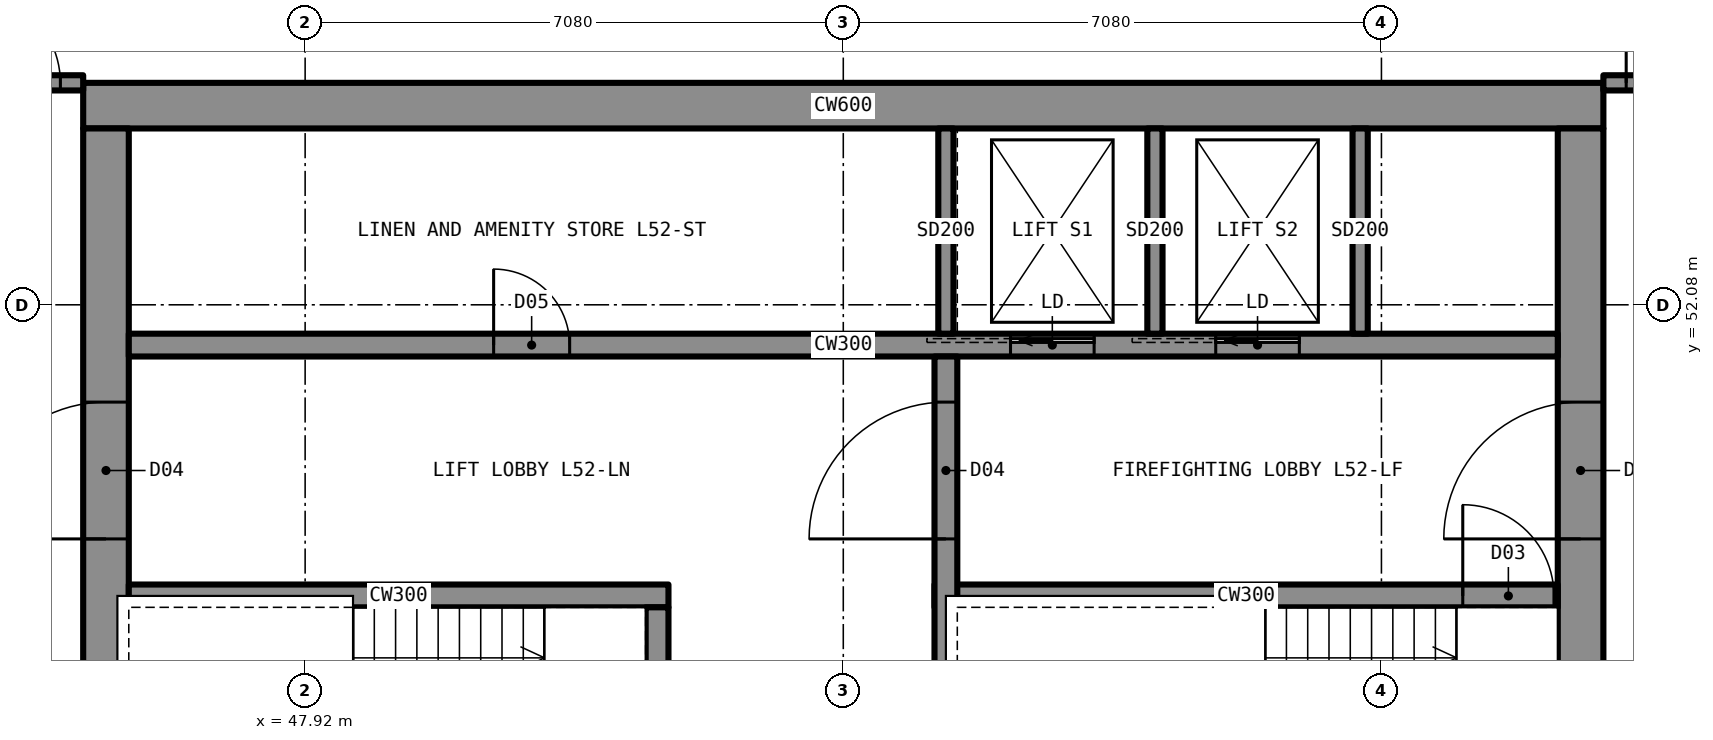
"""IFC4 building model, lengths in metres.
Left out: names, types, materials, properties, quantities, classifications, styles, units other than length and angle.
Written with IfcOpenShell. Run it as: python <this file> out.ifc"""

import sys

from ifc_helpers import new_model, si_unit, direction, frame, frame_2d, origin, place, context, subcontext, project, spatial, rectangle, extrude, element, fill, save


model = new_model("IFC4")
c1 = context("Model", 3, precision=1e-05, world=origin(), true_north=direction((0.0, 1.0)))
c2 = subcontext(c1, "Body", "Model", "MODEL_VIEW")
j1 = project(units=[si_unit("LENGTHUNIT", "METRE"), si_unit("PLANEANGLEUNIT", "RADIAN")], contexts=[c1])
p1 = place(None, origin())
s1 = spatial("IfcSite", under=j1, at=p1, CompositionType="ELEMENT")
p2 = place(p1, origin())
s2 = spatial("IfcBuilding", under=s1, at=p2, CompositionType="ELEMENT")
p3 = place(p2, frame((0.0, 0.0, 193.3)))
s3 = spatial("IfcBuildingStorey", under=s2, at=p3, CompositionType="ELEMENT", Elevation=193.3)
p4 = place(p3, frame((45.0, 54.7, 0.0), z_axis=(0.0, 0.0, 1.0), x_axis=(1.0, 0.0, 0.0)))
e1 = element("IfcWall", 1, at=p4, inside=s3, PredefinedType="SHEAR", context=c2, shape_type="SweptSolid", body=[
    extrude(rectangle(XDim=20.0, YDim=0.6, at=frame_2d((10.0, 0.0))), origin(), (0.0, 0.0, 1.0), 3.5),
])
p5 = place(p3, frame((64.7, 35.6, 0.0), z_axis=(0.0, 0.0, 1.0), x_axis=(0.0, 1.0, 0.0)))
e2 = element("IfcWall", 2, at=p5, inside=s3, PredefinedType="SHEAR", context=c2, shape_type="SweptSolid", body=[
    extrude(rectangle(XDim=18.8, YDim=0.6, at=frame_2d((9.4, 0.0))), origin(), (0.0, 0.0, 1.0), 3.5),
])
p6 = place(p5, frame((13.4, 0.0, 0.0)))
e3 = element("IfcOpeningElement", 3, at=p6, cuts=e2, PredefinedType="OPENING", context=c2, shape_type="SweptSolid", body=[
    extrude(rectangle(XDim=1.8, YDim=2.2, at=frame_2d((0.9, 1.1))), frame((0.0, 0.31, 0.0), z_axis=(0.0, -1.0, 0.0), x_axis=(1.0, 0.0, 0.0)), (0.0, 0.0, 1.0), 0.62),
])
p7 = place(p5, frame((3.6, 0.0, 0.0)))
e4 = element("IfcOpeningElement", 4, at=p7, cuts=e2, PredefinedType="OPENING", context=c2, shape_type="SweptSolid", body=[
    extrude(rectangle(XDim=1.8, YDim=2.2, at=frame_2d((0.9, 1.1))), frame((0.0, 0.31, 0.0), z_axis=(0.0, -1.0, 0.0), x_axis=(1.0, 0.0, 0.0)), (0.0, 0.0, 1.0), 0.62),
])
p8 = place(p3, frame((45.3, 35.6, 0.0), z_axis=(0.0, 0.0, 1.0), x_axis=(0.0, 1.0, 0.0)))
e5 = element("IfcWall", 5, at=p8, inside=s3, PredefinedType="SHEAR", context=c2, shape_type="SweptSolid", body=[
    extrude(rectangle(XDim=18.8, YDim=0.6, at=frame_2d((9.4, 0.0))), origin(), (0.0, 0.0, 1.0), 3.5),
])
p9 = place(p8, frame((13.4, 0.0, 0.0)))
e6 = element("IfcOpeningElement", 6, at=p9, cuts=e5, PredefinedType="OPENING", context=c2, shape_type="SweptSolid", body=[
    extrude(rectangle(XDim=1.8, YDim=2.2, at=frame_2d((0.9, 1.1))), frame((0.0, 0.31, 0.0), z_axis=(0.0, -1.0, 0.0), x_axis=(1.0, 0.0, 0.0)), (0.0, 0.0, 1.0), 0.62),
])
p10 = place(p8, frame((3.6, 0.0, 0.0)))
e7 = element("IfcOpeningElement", 7, at=p10, cuts=e5, PredefinedType="OPENING", context=c2, shape_type="SweptSolid", body=[
    extrude(rectangle(XDim=1.8, YDim=2.2, at=frame_2d((0.9, 1.1))), frame((0.0, 0.31, 0.0), z_axis=(0.0, -1.0, 0.0), x_axis=(1.0, 0.0, 0.0)), (0.0, 0.0, 1.0), 0.62),
])
p11 = place(p8, frame((6.4, 0.0, 0.0)))
e8 = element("IfcOpeningElement", 8, at=p11, cuts=e5, PredefinedType="OPENING", context=c2, shape_type="SweptSolid", body=[
    extrude(rectangle(XDim=1.2, YDim=2.2, at=frame_2d((0.6, 1.1))), frame((0.0, 0.31, 0.0), z_axis=(0.0, -1.0, 0.0), x_axis=(1.0, 0.0, 0.0)), (0.0, 0.0, 1.0), 0.62),
])
p12 = place(p3, frame((45.6, 51.55, 0.0), z_axis=(0.0, 0.0, 1.0), x_axis=(1.0, 0.0, 0.0)))
e9 = element("IfcWall", 9, at=p12, inside=s3, PredefinedType="SHEAR", context=c2, shape_type="SweptSolid", body=[
    extrude(rectangle(XDim=18.8, YDim=0.3, at=frame_2d((9.4, 0.0))), origin(), (0.0, 0.0, 1.0), 3.5),
])
p13 = place(p12, frame((4.8, 0.0, 0.0)))
e10 = element("IfcOpeningElement", 10, at=p13, cuts=e9, PredefinedType="OPENING", context=c2, shape_type="SweptSolid", body=[
    extrude(rectangle(XDim=1.0, YDim=2.1, at=frame_2d((0.5, 1.05))), frame((0.0, 0.16, 0.0), z_axis=(0.0, -1.0, 0.0), x_axis=(1.0, 0.0, 0.0)), (0.0, 0.0, 1.0), 0.32),
])
p14 = place(p12, frame((11.6, 0.0, 0.0)))
e11 = element("IfcOpeningElement", 11, at=p14, cuts=e9, PredefinedType="OPENING", context=c2, shape_type="SweptSolid", body=[
    extrude(rectangle(XDim=1.1, YDim=2.2, at=frame_2d((0.55, 1.1))), frame((0.0, 0.16, 0.0), z_axis=(0.0, -1.0, 0.0), x_axis=(1.0, 0.0, 0.0)), (0.0, 0.0, 1.0), 0.32),
])
p15 = place(p12, frame((14.3, 0.0, 0.0)))
e12 = element("IfcOpeningElement", 12, at=p15, cuts=e9, PredefinedType="OPENING", context=c2, shape_type="SweptSolid", body=[
    extrude(rectangle(XDim=1.1, YDim=2.2, at=frame_2d((0.55, 1.1))), frame((0.0, 0.16, 0.0), z_axis=(0.0, -1.0, 0.0), x_axis=(1.0, 0.0, 0.0)), (0.0, 0.0, 1.0), 0.32),
])
p16 = place(p3, frame((45.6, 48.25, 0.0), z_axis=(0.0, 0.0, 1.0), x_axis=(1.0, 0.0, 0.0)))
e13 = element("IfcWall", 13, at=p16, inside=s3, PredefinedType="SHEAR", context=c2, shape_type="SweptSolid", body=[
    extrude(rectangle(XDim=7.1, YDim=0.3, at=frame_2d((3.55, 0.0))), origin(), (0.0, 0.0, 1.0), 3.5),
])
p17 = place(p3, frame((56.2, 48.25, 0.0), z_axis=(0.0, 0.0, 1.0), x_axis=(1.0, 0.0, 0.0)))
e14 = element("IfcWall", 14, at=p17, inside=s3, PredefinedType="SHEAR", context=c2, shape_type="SweptSolid", body=[
    extrude(rectangle(XDim=8.2, YDim=0.3, at=frame_2d((4.1, 0.0))), origin(), (0.0, 0.0, 1.0), 3.5),
])
p18 = place(p17, frame((6.95, 0.0, 0.0)))
e15 = element("IfcOpeningElement", 15, at=p18, cuts=e14, PredefinedType="OPENING", context=c2, shape_type="SweptSolid", body=[
    extrude(rectangle(XDim=1.2, YDim=2.2, at=frame_2d((0.6, 1.1))), frame((0.0, 0.16, 0.0), z_axis=(0.0, -1.0, 0.0), x_axis=(1.0, 0.0, 0.0)), (0.0, 0.0, 1.0), 0.32),
])
p19 = place(p3, frame((52.55, 41.9, 0.0), z_axis=(0.0, 0.0, 1.0), x_axis=(0.0, 1.0, 0.0)))
e16 = element("IfcWall", 16, at=p19, inside=s3, PredefinedType="SHEAR", context=c2, shape_type="SweptSolid", body=[
    extrude(rectangle(XDim=6.2, YDim=0.3, at=frame_2d((3.1, 0.0))), origin(), (0.0, 0.0, 1.0), 3.5),
])
p20 = place(p19, frame((4.125, 0.0, 0.0)))
e17 = element("IfcOpeningElement", 17, at=p20, cuts=e16, PredefinedType="OPENING", context=c2, shape_type="SweptSolid", body=[
    extrude(rectangle(XDim=1.2, YDim=2.2, at=frame_2d((0.6, 1.1))), frame((0.0, 0.16, 0.0), z_axis=(0.0, -1.0, 0.0), x_axis=(1.0, 0.0, 0.0)), (0.0, 0.0, 1.0), 0.32),
])
p21 = place(p3, frame((56.35, 41.9, 0.0), z_axis=(0.0, 0.0, 1.0), x_axis=(0.0, 1.0, 0.0)))
e18 = element("IfcWall", 18, at=p21, inside=s3, PredefinedType="SHEAR", context=c2, shape_type="SweptSolid", body=[
    extrude(rectangle(XDim=9.5, YDim=0.3, at=frame_2d((4.75, 0.0))), origin(), (0.0, 0.0, 1.0), 3.5),
])
p22 = place(p21, frame((7.1, 0.0, 0.0)))
e19 = element("IfcOpeningElement", 19, at=p22, cuts=e18, PredefinedType="OPENING", context=c2, shape_type="SweptSolid", body=[
    extrude(rectangle(XDim=1.8, YDim=2.2, at=frame_2d((0.9, 1.1))), frame((0.0, 0.16, 0.0), z_axis=(0.0, -1.0, 0.0), x_axis=(1.0, 0.0, 0.0)), (0.0, 0.0, 1.0), 0.32),
])
p23 = place(p3, frame((43.2, 55.0, 0.0), z_axis=(0.0, 0.0, 1.0), x_axis=(1.0, 0.0, 0.0)))
e20 = element("IfcWall", 20, at=p23, inside=s3, PredefinedType="PARTITIONING", context=c2, shape_type="SweptSolid", body=[
    extrude(rectangle(XDim=1.8, YDim=0.2, at=frame_2d((0.9, 0.0))), origin(), (0.0, 0.0, 1.0), 3.33),
])
p24 = place(p23, frame((0.3, 0.0, 0.0)))
e21 = element("IfcOpeningElement", 21, at=p24, cuts=e20, PredefinedType="OPENING", context=c2, shape_type="SweptSolid", body=[
    extrude(rectangle(XDim=1.2, YDim=2.2, at=frame_2d((0.6, 1.1))), frame((0.0, 0.11, 0.0), z_axis=(0.0, -1.0, 0.0), x_axis=(1.0, 0.0, 0.0)), (0.0, 0.0, 1.0), 0.22),
])
p25 = place(p3, frame((65.0, 55.0, 0.0), z_axis=(0.0, 0.0, 1.0), x_axis=(1.0, 0.0, 0.0)))
e22 = element("IfcWall", 22, at=p25, inside=s3, PredefinedType="PARTITIONING", context=c2, shape_type="SweptSolid", body=[
    extrude(rectangle(XDim=1.8, YDim=0.2, at=frame_2d((0.9, 0.0))), origin(), (0.0, 0.0, 1.0), 3.33),
])
p26 = place(p25, frame((0.3, 0.0, 0.0)))
e23 = element("IfcOpeningElement", 23, at=p26, cuts=e22, PredefinedType="OPENING", context=c2, shape_type="SweptSolid", body=[
    extrude(rectangle(XDim=1.2, YDim=2.2, at=frame_2d((0.6, 1.1))), frame((0.0, 0.11, 0.0), z_axis=(0.0, -1.0, 0.0), x_axis=(1.0, 0.0, 0.0)), (0.0, 0.0, 1.0), 0.22),
])
for number, where, z_axis, x_axis in (
    (24, (59.1, 51.7, 0.0), (0.0, 0.0, 1.0), (0.0, 1.0, 0.0)),
    (25, (61.8, 51.7, 0.0), (0.0, 0.0, 1.0), (0.0, 1.0, 0.0)),
    (26, (56.35, 51.7, 0.0), (0.0, 0.0, 1.0), (0.0, 1.0, 0.0)),
):
    element("IfcWall", number, at=place(p3, frame(where, z_axis=z_axis, x_axis=x_axis)), inside=s3, PredefinedType="PARTITIONING", context=c2, shape_type="SweptSolid", body=[
        extrude(rectangle(XDim=2.7, YDim=0.2, at=frame_2d((1.35, 0.0))), origin(), (0.0, 0.0, 1.0), 3.33),
    ])
p27 = place(p24, origin())
e27 = element("IfcDoor", 27, at=p27, inside=s3, OperationType="SINGLE_SWING_LEFT", PredefinedType="DOOR", context=c2, shape_type="SweptSolid", body=[
    extrude(rectangle(XDim=1.2, YDim=2.2, at=frame_2d((0.6, 1.1))), frame((0.0, 0.025, 0.0), z_axis=(0.0, -1.0, 0.0), x_axis=(1.0, 0.0, 0.0)), (0.0, 0.0, 1.0), 0.05),
])
fill(e21, e27)
p28 = place(p26, origin())
e28 = element("IfcDoor", 28, at=p28, inside=s3, OperationType="SINGLE_SWING_LEFT", PredefinedType="DOOR", context=c2, shape_type="SweptSolid", body=[
    extrude(rectangle(XDim=1.2, YDim=2.2, at=frame_2d((0.6, 1.1))), frame((0.0, 0.025, 0.0), z_axis=(0.0, -1.0, 0.0), x_axis=(1.0, 0.0, 0.0)), (0.0, 0.0, 1.0), 0.05),
])
fill(e23, e28)
p29 = place(p9, origin())
e29 = element("IfcDoor", 29, at=p29, inside=s3, OperationType="DOUBLE_DOOR_SINGLE_SWING", PredefinedType="DOOR", context=c2, shape_type="SweptSolid", body=[
    extrude(rectangle(XDim=1.8, YDim=2.2, at=frame_2d((0.9, 1.1))), frame((0.0, 0.025, 0.0), z_axis=(0.0, -1.0, 0.0), x_axis=(1.0, 0.0, 0.0)), (0.0, 0.0, 1.0), 0.05),
])
fill(e6, e29)
p30 = place(p6, origin())
e30 = element("IfcDoor", 30, at=p30, inside=s3, OperationType="DOUBLE_DOOR_SINGLE_SWING", PredefinedType="DOOR", context=c2, shape_type="SweptSolid", body=[
    extrude(rectangle(XDim=1.8, YDim=2.2, at=frame_2d((0.9, 1.1))), frame((0.0, 0.025, 0.0), z_axis=(0.0, -1.0, 0.0), x_axis=(1.0, 0.0, 0.0)), (0.0, 0.0, 1.0), 0.05),
])
fill(e3, e30)
p31 = place(p22, origin())
e31 = element("IfcDoor", 31, at=p31, inside=s3, OperationType="DOUBLE_DOOR_SINGLE_SWING", PredefinedType="DOOR", context=c2, shape_type="SweptSolid", body=[
    extrude(rectangle(XDim=1.8, YDim=2.2, at=frame_2d((0.9, 1.1))), frame((0.0, 0.025, 0.0), z_axis=(0.0, -1.0, 0.0), x_axis=(1.0, 0.0, 0.0)), (0.0, 0.0, 1.0), 0.05),
])
fill(e19, e31)
p32 = place(p18, origin())
e32 = element("IfcDoor", 32, at=p32, inside=s3, OperationType="SINGLE_SWING_LEFT", PredefinedType="DOOR", context=c2, shape_type="SweptSolid", body=[
    extrude(rectangle(XDim=1.2, YDim=2.2, at=frame_2d((0.6, 1.1))), frame((0.0, 0.025, 0.0), z_axis=(0.0, -1.0, 0.0), x_axis=(1.0, 0.0, 0.0)), (0.0, 0.0, 1.0), 0.05),
])
fill(e15, e32)
p33 = place(p13, origin())
e33 = element("IfcDoor", 33, at=p33, inside=s3, OperationType="SINGLE_SWING_LEFT", PredefinedType="DOOR", context=c2, shape_type="SweptSolid", body=[
    extrude(rectangle(XDim=1.0, YDim=2.1, at=frame_2d((0.5, 1.05))), frame((0.0, 0.025, 0.0), z_axis=(0.0, -1.0, 0.0), x_axis=(1.0, 0.0, 0.0)), (0.0, 0.0, 1.0), 0.05),
])
fill(e10, e33)
p34 = place(p14, origin())
e34 = element("IfcDoor", 34, at=p34, inside=s3, OperationType="SLIDING_TO_LEFT", PredefinedType="DOOR", context=c2, shape_type="SweptSolid", body=[
    extrude(rectangle(XDim=1.1, YDim=2.2, at=frame_2d((0.55, 1.1))), frame((0.0, 0.025, 0.0), z_axis=(0.0, -1.0, 0.0), x_axis=(1.0, 0.0, 0.0)), (0.0, 0.0, 1.0), 0.05),
])
fill(e11, e34)
p35 = place(p15, origin())
e35 = element("IfcDoor", 35, at=p35, inside=s3, OperationType="SLIDING_TO_LEFT", PredefinedType="DOOR", context=c2, shape_type="SweptSolid", body=[
    extrude(rectangle(XDim=1.1, YDim=2.2, at=frame_2d((0.55, 1.1))), frame((0.0, 0.025, 0.0), z_axis=(0.0, -1.0, 0.0), x_axis=(1.0, 0.0, 0.0)), (0.0, 0.0, 1.0), 0.05),
])
fill(e12, e35)
save(model, sys.argv[1])
